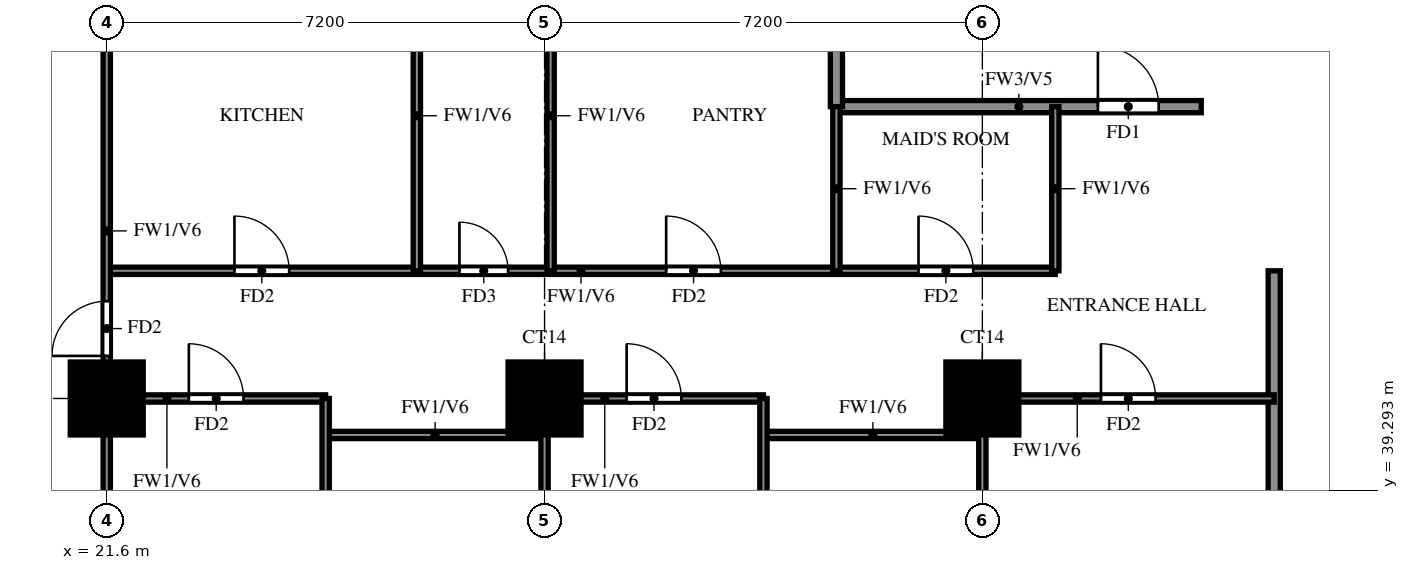
"""IFC4 building model, lengths in metres.
Left out: names, types, materials, properties, quantities, classifications, styles, units other than length and angle.
Written with IfcOpenShell. Run it as: python <this file> out.ifc"""

import sys

from ifc_helpers import new_model, si_unit, direction, frame, frame_2d, origin, origin_2d, place, context, subcontext, project, spatial, rectangle, extrude, source, transform, mapped, element, fill, save


model = new_model("IFC4")
c1 = context("Model", 3, precision=1e-05, world=origin(), true_north=direction((0.0, 1.0)))
c2 = subcontext(c1, "Body", "Model", "MODEL_VIEW")
j1 = project(units=[si_unit("LENGTHUNIT", "METRE"), si_unit("PLANEANGLEUNIT", "RADIAN")], contexts=[c1])
p1 = place(None, origin())
s1 = spatial("IfcSite", under=j1, at=p1, CompositionType="ELEMENT")
p2 = place(p1, origin())
s2 = spatial("IfcBuilding", under=s1, at=p2, CompositionType="ELEMENT")
p3 = place(p2, frame((0.0, 0.0, 104.0)))
s3 = spatial("IfcBuildingStorey", under=s2, at=p3, CompositionType="ELEMENT", Elevation=104.0)
m1 = source(origin(), c2, "Body", "SweptSolid", [
    extrude(rectangle(XDim=1.2, YDim=1.2, at=origin_2d()), origin(), (0.0, 0.0, 1.0), 3.1),
])
for number, where, z_axis, x_axis in (
    (1, (21.6, 40.8, 0.0), (0.0, 0.0, 1.0), (1.0, 0.0, 0.0)),
    (2, (28.8, 40.8, 0.0), (0.0, 0.0, 1.0), (1.0, 0.0, 0.0)),
    (3, (36.0, 40.8, 0.0), (0.0, 0.0, 1.0), (1.0, 0.0, 0.0)),
):
    element("IfcColumn", number, at=place(p3, frame(where, z_axis=z_axis, x_axis=x_axis)), inside=s3, PredefinedType="COLUMN", context=c2, shape_type="MappedRepresentation", body=[
        mapped(m1, transform((0.0, 0.0, 0.0))),
    ])
p4 = place(p3, frame((33.6, 45.6, 0.0), z_axis=(0.0, 0.0, 1.0), x_axis=(1.0, 0.0, 0.0)))
e4 = element("IfcWall", 4, at=p4, inside=s3, PredefinedType="SOLIDWALL", context=c2, shape_type="SweptSolid", body=[
    extrude(rectangle(XDim=6.0, YDim=0.2, at=frame_2d((3.0, 0.0))), origin(), (0.0, 0.0, 1.0), 3.1),
])
p5 = place(p4, frame((4.3, 0.0, 0.0)))
e5 = element("IfcOpeningElement", 5, at=p5, cuts=e4, PredefinedType="OPENING", context=c2, shape_type="SweptSolid", body=[
    extrude(rectangle(XDim=1.0, YDim=2.1, at=frame_2d((0.5, 1.05))), frame((0.0, 0.11, 0.0), z_axis=(0.0, -1.0, 0.0), x_axis=(1.0, 0.0, 0.0)), (0.0, 0.0, 1.0), 0.22),
])
p6 = place(p3, frame((33.6, 45.6, 0.0), z_axis=(0.0, 0.0, 1.0), x_axis=(0.0, 1.0, 0.0)))
e6 = element("IfcWall", 6, at=p6, inside=s3, PredefinedType="SOLIDWALL", context=c2, shape_type="SweptSolid", body=[
    extrude(rectangle(XDim=10.8, YDim=0.2, at=frame_2d((5.4, 0.0))), origin(), (0.0, 0.0, 1.0), 3.1),
])
p7 = place(p3, frame((40.8, 33.725, 0.0), z_axis=(0.0, 0.0, 1.0), x_axis=(0.0, 1.0, 0.0)))
e7 = element("IfcWall", 7, at=p7, inside=s3, PredefinedType="SOLIDWALL", context=c2, shape_type="SweptSolid", body=[
    extrude(rectangle(XDim=9.175, YDim=0.2, at=frame_2d((4.587, 0.0))), origin(), (0.0, 0.0, 1.0), 3.1),
])
for number, where, z_axis, x_axis in (
    (8, (25.2, 40.2, 0.0), (0.0, 0.0, 1.0), (1.0, 0.0, 0.0)),
    (9, (32.4, 40.2, 0.0), (0.0, 0.0, 1.0), (1.0, 0.0, 0.0)),
):
    element("IfcWall", number, at=place(p3, frame(where, z_axis=z_axis, x_axis=x_axis)), inside=s3, PredefinedType="PARTITIONING", context=c2, shape_type="SweptSolid", body=[
        extrude(rectangle(XDim=3.6, YDim=0.12, at=frame_2d((1.8, 0.0))), origin(), (0.0, 0.0, 1.0), 3.1),
    ])
p8 = place(p3, frame((21.6, 40.8, 0.0), z_axis=(0.0, 0.0, 1.0), x_axis=(1.0, 0.0, 0.0)))
e10 = element("IfcWall", 10, at=p8, inside=s3, PredefinedType="PARTITIONING", context=c2, shape_type="SweptSolid", body=[
    extrude(rectangle(XDim=3.6, YDim=0.12, at=frame_2d((1.8, 0.0))), origin(), (0.0, 0.0, 1.0), 3.1),
])
p9 = place(p8, frame((1.35, 0.0, 0.0)))
e11 = element("IfcOpeningElement", 11, at=p9, cuts=e10, PredefinedType="OPENING", context=c2, shape_type="SweptSolid", body=[
    extrude(rectangle(XDim=0.9, YDim=2.1, at=frame_2d((0.45, 1.05))), frame((0.0, 0.07, 0.0), z_axis=(0.0, -1.0, 0.0), x_axis=(1.0, 0.0, 0.0)), (0.0, 0.0, 1.0), 0.14),
])
p10 = place(p3, frame((28.8, 40.8, 0.0), z_axis=(0.0, 0.0, 1.0), x_axis=(1.0, 0.0, 0.0)))
e12 = element("IfcWall", 12, at=p10, inside=s3, PredefinedType="PARTITIONING", context=c2, shape_type="SweptSolid", body=[
    extrude(rectangle(XDim=3.6, YDim=0.12, at=frame_2d((1.8, 0.0))), origin(), (0.0, 0.0, 1.0), 3.1),
])
p11 = place(p10, frame((1.35, 0.0, 0.0)))
e13 = element("IfcOpeningElement", 13, at=p11, cuts=e12, PredefinedType="OPENING", context=c2, shape_type="SweptSolid", body=[
    extrude(rectangle(XDim=0.9, YDim=2.1, at=frame_2d((0.45, 1.05))), frame((0.0, 0.07, 0.0), z_axis=(0.0, -1.0, 0.0), x_axis=(1.0, 0.0, 0.0)), (0.0, 0.0, 1.0), 0.14),
])
p12 = place(p3, frame((36.0, 40.8, 0.0), z_axis=(0.0, 0.0, 1.0), x_axis=(1.0, 0.0, 0.0)))
e14 = element("IfcWall", 14, at=p12, inside=s3, PredefinedType="PARTITIONING", context=c2, shape_type="SweptSolid", body=[
    extrude(rectangle(XDim=4.8, YDim=0.12, at=frame_2d((2.4, 0.0))), origin(), (0.0, 0.0, 1.0), 3.1),
])
p13 = place(p12, frame((1.95, 0.0, 0.0)))
e15 = element("IfcOpeningElement", 15, at=p13, cuts=e14, PredefinedType="OPENING", context=c2, shape_type="SweptSolid", body=[
    extrude(rectangle(XDim=0.9, YDim=2.1, at=frame_2d((0.45, 1.05))), frame((0.0, 0.07, 0.0), z_axis=(0.0, -1.0, 0.0), x_axis=(1.0, 0.0, 0.0)), (0.0, 0.0, 1.0), 0.14),
])
p14 = place(p3, frame((21.6, 42.9, 0.0), z_axis=(0.0, 0.0, 1.0), x_axis=(1.0, 0.0, 0.0)))
e16 = element("IfcWall", 16, at=p14, inside=s3, PredefinedType="PARTITIONING", context=c2, shape_type="SweptSolid", body=[
    extrude(rectangle(XDim=15.6, YDim=0.12, at=frame_2d((7.8, 0.0))), origin(), (0.0, 0.0, 1.0), 3.1),
])
p15 = place(p14, frame((2.1, 0.0, 0.0)))
e17 = element("IfcOpeningElement", 17, at=p15, cuts=e16, PredefinedType="OPENING", context=c2, shape_type="SweptSolid", body=[
    extrude(rectangle(XDim=0.9, YDim=2.1, at=frame_2d((0.45, 1.05))), frame((0.0, 0.07, 0.0), z_axis=(0.0, -1.0, 0.0), x_axis=(1.0, 0.0, 0.0)), (0.0, 0.0, 1.0), 0.14),
])
p16 = place(p14, frame((5.8, 0.0, 0.0)))
e18 = element("IfcOpeningElement", 18, at=p16, cuts=e16, PredefinedType="OPENING", context=c2, shape_type="SweptSolid", body=[
    extrude(rectangle(XDim=0.8, YDim=2.1, at=frame_2d((0.4, 1.05))), frame((0.0, 0.07, 0.0), z_axis=(0.0, -1.0, 0.0), x_axis=(1.0, 0.0, 0.0)), (0.0, 0.0, 1.0), 0.14),
])
p17 = place(p14, frame((9.2, 0.0, 0.0)))
e19 = element("IfcOpeningElement", 19, at=p17, cuts=e16, PredefinedType="OPENING", context=c2, shape_type="SweptSolid", body=[
    extrude(rectangle(XDim=0.9, YDim=2.1, at=frame_2d((0.45, 1.05))), frame((0.0, 0.07, 0.0), z_axis=(0.0, -1.0, 0.0), x_axis=(1.0, 0.0, 0.0)), (0.0, 0.0, 1.0), 0.14),
])
p18 = place(p14, frame((13.35, 0.0, 0.0)))
e20 = element("IfcOpeningElement", 20, at=p18, cuts=e16, PredefinedType="OPENING", context=c2, shape_type="SweptSolid", body=[
    extrude(rectangle(XDim=0.9, YDim=2.1, at=frame_2d((0.45, 1.05))), frame((0.0, 0.07, 0.0), z_axis=(0.0, -1.0, 0.0), x_axis=(1.0, 0.0, 0.0)), (0.0, 0.0, 1.0), 0.14),
])
p19 = place(p3, frame((21.6, 33.725, 0.0), z_axis=(0.0, 0.0, 1.0), x_axis=(0.0, 1.0, 0.0)))
e21 = element("IfcWall", 21, at=p19, inside=s3, PredefinedType="PARTITIONING", context=c2, shape_type="SweptSolid", body=[
    extrude(rectangle(XDim=17.875, YDim=0.12, at=frame_2d((8.938, 0.0))), origin(), (0.0, 0.0, 1.0), 3.1),
])
p20 = place(p19, frame((7.775, 0.0, 0.0)))
e22 = element("IfcOpeningElement", 22, at=p20, cuts=e21, PredefinedType="OPENING", context=c2, shape_type="SweptSolid", body=[
    extrude(rectangle(XDim=0.9, YDim=2.1, at=frame_2d((0.45, 1.05))), frame((0.0, 0.07, 0.0), z_axis=(0.0, -1.0, 0.0), x_axis=(1.0, 0.0, 0.0)), (0.0, 0.0, 1.0), 0.14),
])
p21 = place(p19, frame((15.625, 0.0, 0.0)))
e23 = element("IfcOpeningElement", 23, at=p21, cuts=e21, PredefinedType="OPENING", context=c2, shape_type="SweptSolid", body=[
    extrude(rectangle(XDim=0.9, YDim=2.1, at=frame_2d((0.45, 1.05))), frame((0.0, 0.07, 0.0), z_axis=(0.0, -1.0, 0.0), x_axis=(1.0, 0.0, 0.0)), (0.0, 0.0, 1.0), 0.14),
])
p22 = place(p3, frame((25.2, 33.725, 0.0), z_axis=(0.0, 0.0, 1.0), x_axis=(0.0, 1.0, 0.0)))
e24 = element("IfcWall", 24, at=p22, inside=s3, PredefinedType="PARTITIONING", context=c2, shape_type="SweptSolid", body=[
    extrude(rectangle(XDim=7.075, YDim=0.12, at=frame_2d((3.538, 0.0))), origin(), (0.0, 0.0, 1.0), 3.1),
])
p23 = place(p22, frame((2.837, 0.0, 0.0)))
e25 = element("IfcOpeningElement", 25, at=p23, cuts=e24, PredefinedType="OPENING", context=c2, shape_type="SweptSolid", body=[
    extrude(rectangle(XDim=0.8, YDim=2.1, at=frame_2d((0.4, 1.05))), frame((0.0, 0.07, 0.0), z_axis=(0.0, -1.0, 0.0), x_axis=(1.0, 0.0, 0.0)), (0.0, 0.0, 1.0), 0.14),
])
p24 = place(p3, frame((26.7, 42.9, 0.0), z_axis=(0.0, 0.0, 1.0), x_axis=(0.0, 1.0, 0.0)))
e26 = element("IfcWall", 26, at=p24, inside=s3, PredefinedType="PARTITIONING", context=c2, shape_type="SweptSolid", body=[
    extrude(rectangle(XDim=5.1, YDim=0.12, at=frame_2d((2.55, 0.0))), origin(), (0.0, 0.0, 1.0), 3.1),
])
p25 = place(p3, frame((28.8, 33.725, 0.0), z_axis=(0.0, 0.0, 1.0), x_axis=(0.0, 1.0, 0.0)))
e27 = element("IfcWall", 27, at=p25, inside=s3, PredefinedType="PARTITIONING", context=c2, shape_type="SweptSolid", body=[
    extrude(rectangle(XDim=7.075, YDim=0.12, at=frame_2d((3.538, 0.0))), origin(), (0.0, 0.0, 1.0), 3.1),
])
p26 = place(p3, frame((28.9, 42.9, 0.0), z_axis=(0.0, 0.0, 1.0), x_axis=(0.0, 1.0, 0.0)))
e28 = element("IfcWall", 28, at=p26, inside=s3, PredefinedType="PARTITIONING", context=c2, shape_type="SweptSolid", body=[
    extrude(rectangle(XDim=5.1, YDim=0.12, at=frame_2d((2.55, 0.0))), origin(), (0.0, 0.0, 1.0), 3.1),
])
p27 = place(p3, frame((32.4, 33.725, 0.0), z_axis=(0.0, 0.0, 1.0), x_axis=(0.0, 1.0, 0.0)))
e29 = element("IfcWall", 29, at=p27, inside=s3, PredefinedType="PARTITIONING", context=c2, shape_type="SweptSolid", body=[
    extrude(rectangle(XDim=7.075, YDim=0.12, at=frame_2d((3.538, 0.0))), origin(), (0.0, 0.0, 1.0), 3.1),
])
p28 = place(p27, frame((2.837, 0.0, 0.0)))
e30 = element("IfcOpeningElement", 30, at=p28, cuts=e29, PredefinedType="OPENING", context=c2, shape_type="SweptSolid", body=[
    extrude(rectangle(XDim=0.8, YDim=2.1, at=frame_2d((0.4, 1.05))), frame((0.0, 0.07, 0.0), z_axis=(0.0, -1.0, 0.0), x_axis=(1.0, 0.0, 0.0)), (0.0, 0.0, 1.0), 0.14),
])
p29 = place(p3, frame((33.6, 42.9, 0.0), z_axis=(0.0, 0.0, 1.0), x_axis=(0.0, 1.0, 0.0)))
e31 = element("IfcWall", 31, at=p29, inside=s3, PredefinedType="PARTITIONING", context=c2, shape_type="SweptSolid", body=[
    extrude(rectangle(XDim=2.7, YDim=0.12, at=frame_2d((1.35, 0.0))), origin(), (0.0, 0.0, 1.0), 3.1),
])
p30 = place(p3, frame((36.0, 33.725, 0.0), z_axis=(0.0, 0.0, 1.0), x_axis=(0.0, 1.0, 0.0)))
e32 = element("IfcWall", 32, at=p30, inside=s3, PredefinedType="PARTITIONING", context=c2, shape_type="SweptSolid", body=[
    extrude(rectangle(XDim=7.075, YDim=0.12, at=frame_2d((3.538, 0.0))), origin(), (0.0, 0.0, 1.0), 3.1),
])
p31 = place(p3, frame((37.2, 42.9, 0.0), z_axis=(0.0, 0.0, 1.0), x_axis=(0.0, 1.0, 0.0)))
e33 = element("IfcWall", 33, at=p31, inside=s3, PredefinedType="PARTITIONING", context=c2, shape_type="SweptSolid", body=[
    extrude(rectangle(XDim=2.7, YDim=0.12, at=frame_2d((1.35, 0.0))), origin(), (0.0, 0.0, 1.0), 3.1),
])
p32 = place(p5, origin())
e34 = element("IfcDoor", 34, at=p32, inside=s3, OperationType="SINGLE_SWING_RIGHT", PredefinedType="DOOR", context=c2, shape_type="SweptSolid", body=[
    extrude(rectangle(XDim=1.0, YDim=2.1, at=frame_2d((0.5, 1.05))), frame((0.0, 0.025, 0.0), z_axis=(0.0, -1.0, 0.0), x_axis=(1.0, 0.0, 0.0)), (0.0, 0.0, 1.0), 0.05),
])
fill(e5, e34)
p33 = place(p20, origin())
e35 = element("IfcDoor", 35, at=p33, inside=s3, OperationType="SINGLE_SWING_RIGHT", PredefinedType="DOOR", context=c2, shape_type="SweptSolid", body=[
    extrude(rectangle(XDim=0.9, YDim=2.1, at=frame_2d((0.45, 1.05))), frame((0.0, 0.025, 0.0), z_axis=(0.0, -1.0, 0.0), x_axis=(1.0, 0.0, 0.0)), (0.0, 0.0, 1.0), 0.05),
])
fill(e22, e35)
p34 = place(p9, origin())
e36 = element("IfcDoor", 36, at=p34, inside=s3, OperationType="SINGLE_SWING_LEFT", PredefinedType="DOOR", context=c2, shape_type="SweptSolid", body=[
    extrude(rectangle(XDim=0.9, YDim=2.1, at=frame_2d((0.45, 1.05))), frame((0.0, 0.025, 0.0), z_axis=(0.0, -1.0, 0.0), x_axis=(1.0, 0.0, 0.0)), (0.0, 0.0, 1.0), 0.05),
])
fill(e11, e36)
p35 = place(p11, origin())
e37 = element("IfcDoor", 37, at=p35, inside=s3, OperationType="SINGLE_SWING_LEFT", PredefinedType="DOOR", context=c2, shape_type="SweptSolid", body=[
    extrude(rectangle(XDim=0.9, YDim=2.1, at=frame_2d((0.45, 1.05))), frame((0.0, 0.025, 0.0), z_axis=(0.0, -1.0, 0.0), x_axis=(1.0, 0.0, 0.0)), (0.0, 0.0, 1.0), 0.05),
])
fill(e13, e37)
p36 = place(p13, origin())
e38 = element("IfcDoor", 38, at=p36, inside=s3, OperationType="SINGLE_SWING_RIGHT", PredefinedType="DOOR", context=c2, shape_type="SweptSolid", body=[
    extrude(rectangle(XDim=0.9, YDim=2.1, at=frame_2d((0.45, 1.05))), frame((0.0, 0.025, 0.0), z_axis=(0.0, -1.0, 0.0), x_axis=(1.0, 0.0, 0.0)), (0.0, 0.0, 1.0), 0.05),
])
fill(e15, e38)
p37 = place(p15, origin())
e39 = element("IfcDoor", 39, at=p37, inside=s3, OperationType="SINGLE_SWING_LEFT", PredefinedType="DOOR", context=c2, shape_type="SweptSolid", body=[
    extrude(rectangle(XDim=0.9, YDim=2.1, at=frame_2d((0.45, 1.05))), frame((0.0, 0.025, 0.0), z_axis=(0.0, -1.0, 0.0), x_axis=(1.0, 0.0, 0.0)), (0.0, 0.0, 1.0), 0.05),
])
fill(e17, e39)
p38 = place(p16, origin())
e40 = element("IfcDoor", 40, at=p38, inside=s3, OperationType="SINGLE_SWING_LEFT", PredefinedType="DOOR", context=c2, shape_type="SweptSolid", body=[
    extrude(rectangle(XDim=0.8, YDim=2.1, at=frame_2d((0.4, 1.05))), frame((0.0, 0.025, 0.0), z_axis=(0.0, -1.0, 0.0), x_axis=(1.0, 0.0, 0.0)), (0.0, 0.0, 1.0), 0.05),
])
fill(e18, e40)
p39 = place(p17, origin())
e41 = element("IfcDoor", 41, at=p39, inside=s3, OperationType="SINGLE_SWING_RIGHT", PredefinedType="DOOR", context=c2, shape_type="SweptSolid", body=[
    extrude(rectangle(XDim=0.9, YDim=2.1, at=frame_2d((0.45, 1.05))), frame((0.0, 0.025, 0.0), z_axis=(0.0, -1.0, 0.0), x_axis=(1.0, 0.0, 0.0)), (0.0, 0.0, 1.0), 0.05),
])
fill(e19, e41)
p40 = place(p18, origin())
e42 = element("IfcDoor", 42, at=p40, inside=s3, OperationType="SINGLE_SWING_LEFT", PredefinedType="DOOR", context=c2, shape_type="SweptSolid", body=[
    extrude(rectangle(XDim=0.9, YDim=2.1, at=frame_2d((0.45, 1.05))), frame((0.0, 0.025, 0.0), z_axis=(0.0, -1.0, 0.0), x_axis=(1.0, 0.0, 0.0)), (0.0, 0.0, 1.0), 0.05),
])
fill(e20, e42)
save(model, sys.argv[1])
